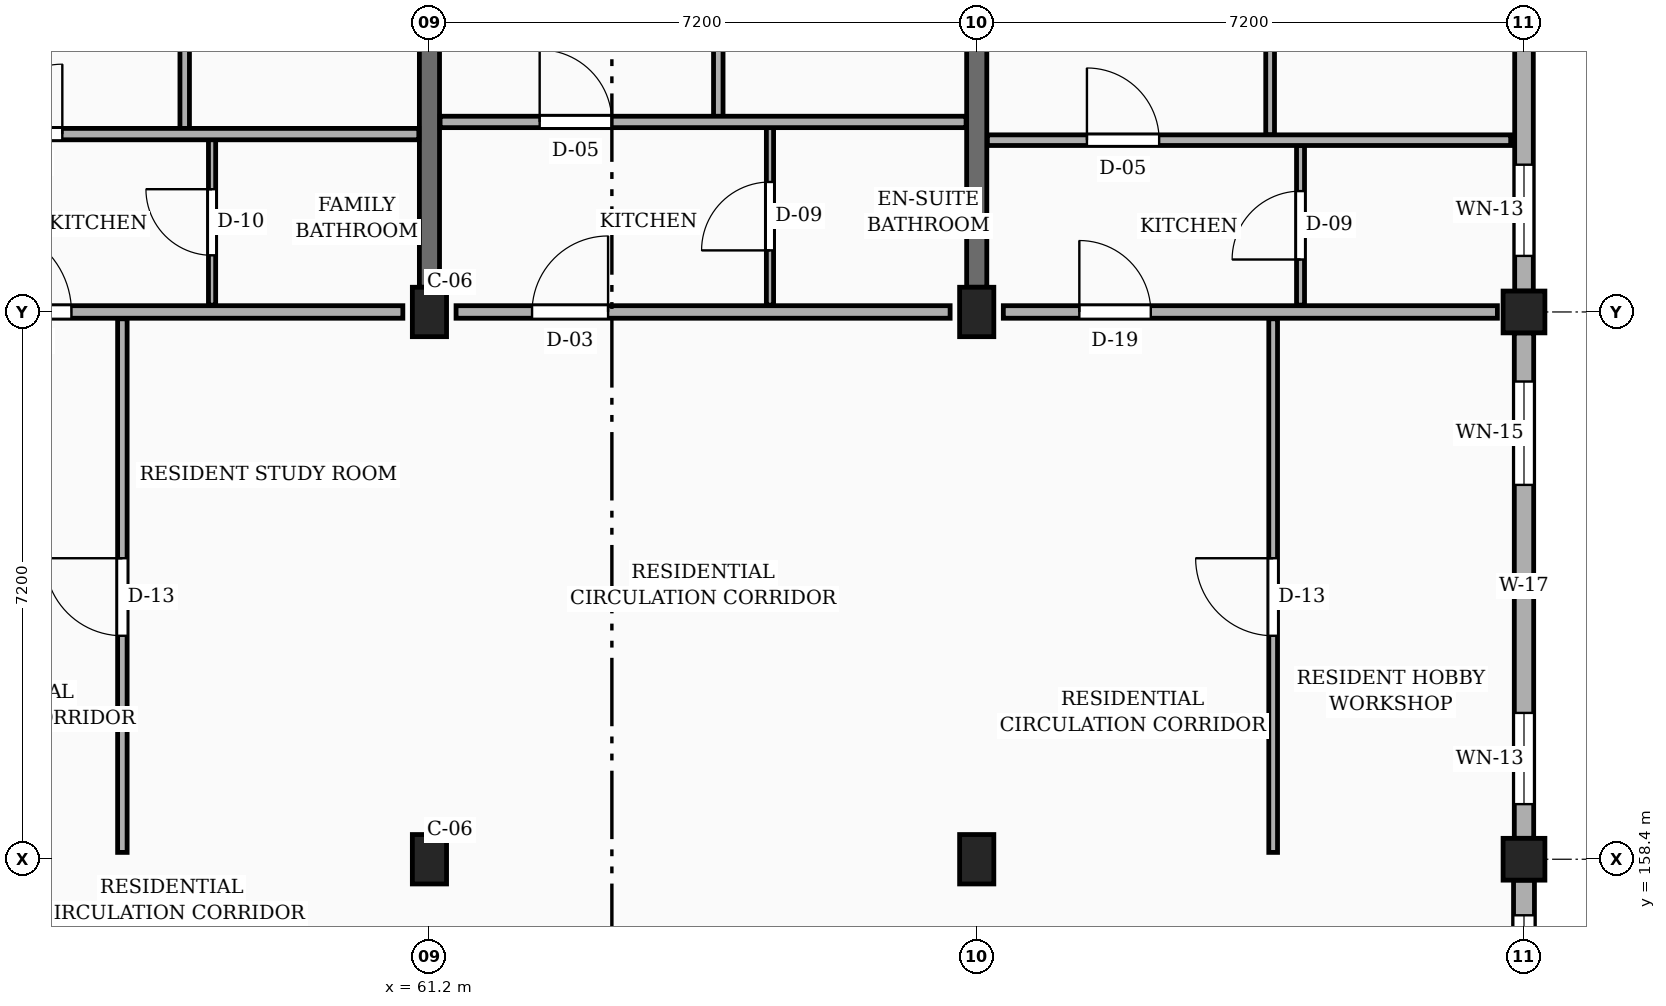
"""IFC4 building model, lengths in metres.
Left out: names, types, materials, properties, quantities, classifications, styles, units other than length and angle.
Written with IfcOpenShell. Run it as: python <this file> out.ifc"""

import sys

from ifc_helpers import new_model, si_unit, direction, frame, frame_2d, origin, origin_2d, place, context, subcontext, project, spatial, rectangle, extrude, element, fill, save


model = new_model("IFC4")
c1 = context("Model", 3, precision=1e-05, world=origin(), true_north=direction((0.0, 1.0)))
c2 = subcontext(c1, "Body", "Model", "MODEL_VIEW")
j1 = project(units=[si_unit("LENGTHUNIT", "METRE"), si_unit("PLANEANGLEUNIT", "RADIAN")], contexts=[c1])
p1 = place(None, origin())
s1 = spatial("IfcSite", under=j1, at=p1, CompositionType="ELEMENT")
p2 = place(p1, origin())
s2 = spatial("IfcBuilding", under=s1, at=p2, CompositionType="ELEMENT")
p3 = place(p2, frame((0.0, 0.0, 10.8)))
s3 = spatial("IfcBuildingStorey", under=s2, at=p3, CompositionType="ELEMENT", Elevation=10.8)
for number, where, z_axis, x_axis in (
    (1, (61.2, 158.4, 0.0), (0.0, 0.0, 1.0), (1.0, 0.0, 0.0)),
    (2, (61.2, 165.6, 0.0), (0.0, 0.0, 1.0), (1.0, 0.0, 0.0)),
    (3, (68.4, 158.4, 0.0), (0.0, 0.0, 1.0), (1.0, 0.0, 0.0)),
    (4, (68.4, 165.6, 0.0), (0.0, 0.0, 1.0), (1.0, 0.0, 0.0)),
):
    element("IfcColumn", number, at=place(p3, frame(where, z_axis=z_axis, x_axis=x_axis)), inside=s3, PredefinedType="COLUMN", context=c2, shape_type="SweptSolid", body=[
        extrude(rectangle(XDim=0.45, YDim=0.65, at=origin_2d()), origin(), (0.0, 0.0, 1.0), 3.15),
    ])
for number, where, z_axis, x_axis in (
    (5, (75.6, 158.4, 0.0), (0.0, 0.0, 1.0), (1.0, 0.0, 0.0)),
    (6, (75.6, 165.6, 0.0), (0.0, 0.0, 1.0), (1.0, 0.0, 0.0)),
):
    element("IfcColumn", number, at=place(p3, frame(where, z_axis=z_axis, x_axis=x_axis)), inside=s3, PredefinedType="COLUMN", context=c2, shape_type="SweptSolid", body=[
        extrude(rectangle(XDim=0.55, YDim=0.55, at=origin_2d()), origin(), (0.0, 0.0, 1.0), 3.15),
    ])
for number, where, z_axis, x_axis in (
    (7, (61.2, 165.925, 0.0), (0.0, 0.0, 1.0), (0.0, 1.0, 0.0)),
    (8, (68.4, 165.925, 0.0), (0.0, 0.0, 1.0), (0.0, 1.0, 0.0)),
):
    element("IfcWall", number, at=place(p3, frame(where, z_axis=z_axis, x_axis=x_axis)), inside=s3, PredefinedType="SOLIDWALL", context=c2, shape_type="SweptSolid", body=[
        extrude(rectangle(XDim=6.6, YDim=0.265, at=frame_2d((3.3, 0.0))), origin(), (0.0, 0.0, 1.0), 2.185),
    ])
p4 = place(p3, frame((75.6, 151.475, 0.0), z_axis=(0.0, 0.0, 1.0), x_axis=(0.0, 1.0, 0.0)))
e9 = element("IfcWall", 9, at=p4, inside=s3, PredefinedType="SOLIDWALL", context=c2, shape_type="SweptSolid", body=[
    extrude(rectangle(XDim=6.65, YDim=0.275, at=frame_2d((3.325, 0.0))), origin(), (0.0, 0.0, 1.0), 2.455),
])
p5 = place(p4, frame((2.155, 0.0, 0.78)))
e10 = element("IfcOpeningElement", 10, at=p5, cuts=e9, PredefinedType="OPENING", context=c2, shape_type="SweptSolid", body=[
    extrude(rectangle(XDim=1.04, YDim=1.26, at=frame_2d((0.52, 0.63))), frame((0.0, 0.147, 0.0), z_axis=(0.0, -1.0, 0.0), x_axis=(1.0, 0.0, 0.0)), (0.0, 0.0, 1.0), 0.295),
])
p6 = place(p4, frame((5.147, 0.0, 0.78)))
e11 = element("IfcOpeningElement", 11, at=p6, cuts=e9, PredefinedType="OPENING", context=c2, shape_type="SweptSolid", body=[
    extrude(rectangle(XDim=1.04, YDim=1.26, at=frame_2d((0.52, 0.63))), frame((0.0, 0.147, 0.0), z_axis=(0.0, -1.0, 0.0), x_axis=(1.0, 0.0, 0.0)), (0.0, 0.0, 1.0), 0.295),
])
p7 = place(p3, frame((75.6, 158.675, 0.0), z_axis=(0.0, 0.0, 1.0), x_axis=(0.0, 1.0, 0.0)))
e12 = element("IfcWall", 12, at=p7, inside=s3, PredefinedType="SOLIDWALL", context=c2, shape_type="SweptSolid", body=[
    extrude(rectangle(XDim=6.65, YDim=0.255, at=frame_2d((3.325, 0.0))), origin(), (0.0, 0.0, 1.0), 2.455),
])
p8 = place(p7, frame((0.45, 0.0, 0.78)))
e13 = element("IfcOpeningElement", 13, at=p8, cuts=e12, PredefinedType="OPENING", context=c2, shape_type="SweptSolid", body=[
    extrude(rectangle(XDim=1.2, YDim=1.26, at=frame_2d((0.6, 0.63))), frame((0.0, 0.137, 0.0), z_axis=(0.0, -1.0, 0.0), x_axis=(1.0, 0.0, 0.0)), (0.0, 0.0, 1.0), 0.275),
])
p9 = place(p7, frame((4.65, 0.0, 0.78)))
e14 = element("IfcOpeningElement", 14, at=p9, cuts=e12, PredefinedType="OPENING", context=c2, shape_type="SweptSolid", body=[
    extrude(rectangle(XDim=1.36, YDim=1.26, at=frame_2d((0.68, 0.63))), frame((0.0, 0.137, 0.0), z_axis=(0.0, -1.0, 0.0), x_axis=(1.0, 0.0, 0.0)), (0.0, 0.0, 1.0), 0.275),
])
p10 = place(p3, frame((75.6, 165.875, 0.0), z_axis=(0.0, 0.0, 1.0), x_axis=(0.0, 1.0, 0.0)))
e15 = element("IfcWall", 15, at=p10, inside=s3, PredefinedType="SOLIDWALL", context=c2, shape_type="SweptSolid", body=[
    extrude(rectangle(XDim=6.65, YDim=0.245, at=frame_2d((3.325, 0.0))), origin(), (0.0, 0.0, 1.0), 2.455),
])
p11 = place(p10, frame((0.462, 0.0, 0.78)))
e16 = element("IfcOpeningElement", 16, at=p11, cuts=e15, PredefinedType="OPENING", context=c2, shape_type="SweptSolid", body=[
    extrude(rectangle(XDim=1.2, YDim=1.26, at=frame_2d((0.6, 0.63))), frame((0.0, 0.133, 0.0), z_axis=(0.0, -1.0, 0.0), x_axis=(1.0, 0.0, 0.0)), (0.0, 0.0, 1.0), 0.265),
])
p12 = place(p10, frame((3.798, 0.0, 0.78)))
e17 = element("IfcOpeningElement", 17, at=p12, cuts=e15, PredefinedType="OPENING", context=c2, shape_type="SweptSolid", body=[
    extrude(rectangle(XDim=0.9, YDim=1.36, at=frame_2d((0.45, 0.68))), frame((0.0, 0.133, 0.0), z_axis=(0.0, -1.0, 0.0), x_axis=(1.0, 0.0, 0.0)), (0.0, 0.0, 1.0), 0.265),
])
p13 = place(p3, frame((54.35, 165.6, 0.0), z_axis=(0.0, 0.0, 1.0), x_axis=(1.0, 0.0, 0.0)))
e18 = element("IfcWall", 18, at=p13, inside=s3, PredefinedType="PARTITIONING", context=c2, shape_type="SweptSolid", body=[
    extrude(rectangle(XDim=6.5, YDim=0.165, at=frame_2d((3.25, 0.0))), origin(), (0.0, 0.0, 1.0), 2.235),
])
p14 = place(p13, frame((1.0, 0.0, 0.0)))
e19 = element("IfcOpeningElement", 19, at=p14, cuts=e18, PredefinedType="OPENING", context=c2, shape_type="SweptSolid", body=[
    extrude(rectangle(XDim=1.14, YDim=2.18, at=frame_2d((0.57, 1.09))), frame((0.0, 0.093, 0.0), z_axis=(0.0, -1.0, 0.0), x_axis=(1.0, 0.0, 0.0)), (0.0, 0.0, 1.0), 0.185),
])
p15 = place(p3, frame((61.55, 165.6, 0.0), z_axis=(0.0, 0.0, 1.0), x_axis=(1.0, 0.0, 0.0)))
e20 = element("IfcWall", 20, at=p15, inside=s3, PredefinedType="PARTITIONING", context=c2, shape_type="SweptSolid", body=[
    extrude(rectangle(XDim=6.5, YDim=0.165, at=frame_2d((3.25, 0.0))), origin(), (0.0, 0.0, 1.0), 2.235),
])
p16 = place(p15, frame((1.0, 0.0, 0.0)))
e21 = element("IfcOpeningElement", 21, at=p16, cuts=e20, PredefinedType="OPENING", context=c2, shape_type="SweptSolid", body=[
    extrude(rectangle(XDim=1.0, YDim=2.15, at=frame_2d((0.5, 1.075))), frame((0.0, 0.093, 0.0), z_axis=(0.0, -1.0, 0.0), x_axis=(1.0, 0.0, 0.0)), (0.0, 0.0, 1.0), 0.185),
])
p17 = place(p3, frame((68.75, 165.6, 0.0), z_axis=(0.0, 0.0, 1.0), x_axis=(1.0, 0.0, 0.0)))
e22 = element("IfcWall", 22, at=p17, inside=s3, PredefinedType="PARTITIONING", context=c2, shape_type="SweptSolid", body=[
    extrude(rectangle(XDim=6.5, YDim=0.165, at=frame_2d((3.25, 0.0))), origin(), (0.0, 0.0, 1.0), 2.235),
])
p18 = place(p17, frame((1.0, 0.0, 0.0)))
e23 = element("IfcOpeningElement", 23, at=p18, cuts=e22, PredefinedType="OPENING", context=c2, shape_type="SweptSolid", body=[
    extrude(rectangle(XDim=0.94, YDim=2.12, at=frame_2d((0.47, 1.06))), frame((0.0, 0.093, 0.0), z_axis=(0.0, -1.0, 0.0), x_axis=(1.0, 0.0, 0.0)), (0.0, 0.0, 1.0), 0.185),
])
p19 = place(p3, frame((57.16, 158.49, 0.0), z_axis=(0.0, 0.0, 1.0), x_axis=(0.0, 1.0, 0.0)))
e24 = element("IfcWall", 24, at=p19, inside=s3, PredefinedType="PARTITIONING", context=c2, shape_type="SweptSolid", body=[
    extrude(rectangle(XDim=7.02, YDim=0.125, at=frame_2d((3.51, 0.0))), origin(), (0.0, 0.0, 1.0), 2.32),
])
p20 = place(p19, frame((2.85, 0.0, 0.0)))
e25 = element("IfcOpeningElement", 25, at=p20, cuts=e24, PredefinedType="OPENING", context=c2, shape_type="SweptSolid", body=[
    extrude(rectangle(XDim=1.02, YDim=2.15, at=frame_2d((0.51, 1.075))), frame((0.0, 0.073, 0.0), z_axis=(0.0, -1.0, 0.0), x_axis=(1.0, 0.0, 0.0)), (0.0, 0.0, 1.0), 0.145),
])
p21 = place(p3, frame((57.98, 168.01, 0.0), z_axis=(0.0, 0.0, 1.0), x_axis=(0.0, 1.0, 0.0)))
e26 = element("IfcWall", 26, at=p21, inside=s3, PredefinedType="PARTITIONING", context=c2, shape_type="SweptSolid", body=[
    extrude(rectangle(XDim=4.615, YDim=0.125, at=frame_2d((2.308, 0.0))), origin(), (0.0, 0.0, 1.0), 2.32),
])
p22 = place(p21, frame((1.867, 0.0, 0.0)))
e27 = element("IfcOpeningElement", 27, at=p22, cuts=e26, PredefinedType="OPENING", context=c2, shape_type="SweptSolid", body=[
    extrude(rectangle(XDim=0.88, YDim=2.08, at=frame_2d((0.44, 1.04))), frame((0.0, 0.073, 0.0), z_axis=(0.0, -1.0, 0.0), x_axis=(1.0, 0.0, 0.0)), (0.0, 0.0, 1.0), 0.145),
])
p23 = place(p3, frame((58.34, 165.69, 0.0), z_axis=(0.0, 0.0, 1.0), x_axis=(0.0, 1.0, 0.0)))
e28 = element("IfcWall", 28, at=p23, inside=s3, PredefinedType="PARTITIONING", context=c2, shape_type="SweptSolid", body=[
    extrude(rectangle(XDim=2.18, YDim=0.095, at=frame_2d((1.09, 0.0))), origin(), (0.0, 0.0, 1.0), 2.32),
])
p24 = place(p23, frame((0.655, 0.0, 0.0)))
e29 = element("IfcOpeningElement", 29, at=p24, cuts=e28, PredefinedType="OPENING", context=c2, shape_type="SweptSolid", body=[
    extrude(rectangle(XDim=0.87, YDim=2.05, at=frame_2d((0.435, 1.025))), frame((0.0, 0.058, 0.0), z_axis=(0.0, -1.0, 0.0), x_axis=(1.0, 0.0, 0.0)), (0.0, 0.0, 1.0), 0.115),
])
p25 = place(p3, frame((54.14, 167.94, 0.0), z_axis=(0.0, 0.0, 1.0), x_axis=(1.0, 0.0, 0.0)))
e30 = element("IfcWall", 30, at=p25, inside=s3, PredefinedType="PARTITIONING", context=c2, shape_type="SweptSolid", body=[
    extrude(rectangle(XDim=6.92, YDim=0.15, at=frame_2d((3.46, 0.0))), origin(), (0.0, 0.0, 1.0), 2.32),
])
p26 = place(p25, frame((1.31, 0.0, 0.0)))
e31 = element("IfcOpeningElement", 31, at=p26, cuts=e30, PredefinedType="OPENING", context=c2, shape_type="SweptSolid", body=[
    extrude(rectangle(XDim=0.92, YDim=2.1, at=frame_2d((0.46, 1.05))), frame((0.0, 0.085, 0.0), z_axis=(0.0, -1.0, 0.0), x_axis=(1.0, 0.0, 0.0)), (0.0, 0.0, 1.0), 0.17),
])
p27 = place(p3, frame((65.0, 168.17, 0.0), z_axis=(0.0, 0.0, 1.0), x_axis=(0.0, 1.0, 0.0)))
e32 = element("IfcWall", 32, at=p27, inside=s3, PredefinedType="PARTITIONING", context=c2, shape_type="SweptSolid", body=[
    extrude(rectangle(XDim=4.455, YDim=0.125, at=frame_2d((2.228, 0.0))), origin(), (0.0, 0.0, 1.0), 2.32),
])
p28 = place(p27, frame((1.778, 0.0, 0.0)))
e33 = element("IfcOpeningElement", 33, at=p28, cuts=e32, PredefinedType="OPENING", context=c2, shape_type="SweptSolid", body=[
    extrude(rectangle(XDim=0.9, YDim=2.1, at=frame_2d((0.45, 1.05))), frame((0.0, 0.073, 0.0), z_axis=(0.0, -1.0, 0.0), x_axis=(1.0, 0.0, 0.0)), (0.0, 0.0, 1.0), 0.145),
])
p29 = place(p3, frame((65.68, 165.69, 0.0), z_axis=(0.0, 0.0, 1.0), x_axis=(0.0, 1.0, 0.0)))
e34 = element("IfcWall", 34, at=p29, inside=s3, PredefinedType="PARTITIONING", context=c2, shape_type="SweptSolid", body=[
    extrude(rectangle(XDim=2.34, YDim=0.095, at=frame_2d((1.17, 0.0))), origin(), (0.0, 0.0, 1.0), 2.32),
])
p30 = place(p29, frame((0.72, 0.0, 0.0)))
e35 = element("IfcOpeningElement", 35, at=p30, cuts=e34, PredefinedType="OPENING", context=c2, shape_type="SweptSolid", body=[
    extrude(rectangle(XDim=0.9, YDim=2.05, at=frame_2d((0.45, 1.025))), frame((0.0, 0.058, 0.0), z_axis=(0.0, -1.0, 0.0), x_axis=(1.0, 0.0, 0.0)), (0.0, 0.0, 1.0), 0.115),
])
p31 = place(p3, frame((61.34, 168.1, 0.0), z_axis=(0.0, 0.0, 1.0), x_axis=(1.0, 0.0, 0.0)))
e36 = element("IfcWall", 36, at=p31, inside=s3, PredefinedType="PARTITIONING", context=c2, shape_type="SweptSolid", body=[
    extrude(rectangle(XDim=6.92, YDim=0.15, at=frame_2d((3.46, 0.0))), origin(), (0.0, 0.0, 1.0), 2.32),
])
p32 = place(p31, frame((1.31, 0.0, 0.0)))
e37 = element("IfcOpeningElement", 37, at=p32, cuts=e36, PredefinedType="OPENING", context=c2, shape_type="SweptSolid", body=[
    extrude(rectangle(XDim=0.95, YDim=2.1, at=frame_2d((0.475, 1.05))), frame((0.0, 0.085, 0.0), z_axis=(0.0, -1.0, 0.0), x_axis=(1.0, 0.0, 0.0)), (0.0, 0.0, 1.0), 0.17),
])
p33 = place(p3, frame((72.3, 158.49, 0.0), z_axis=(0.0, 0.0, 1.0), x_axis=(0.0, 1.0, 0.0)))
e38 = element("IfcWall", 38, at=p33, inside=s3, PredefinedType="PARTITIONING", context=c2, shape_type="SweptSolid", body=[
    extrude(rectangle(XDim=7.02, YDim=0.115, at=frame_2d((3.51, 0.0))), origin(), (0.0, 0.0, 1.0), 2.32),
])
p34 = place(p33, frame((2.85, 0.0, 0.0)))
e39 = element("IfcOpeningElement", 39, at=p34, cuts=e38, PredefinedType="OPENING", context=c2, shape_type="SweptSolid", body=[
    extrude(rectangle(XDim=1.02, YDim=2.15, at=frame_2d((0.51, 1.075))), frame((0.0, 0.067, 0.0), z_axis=(0.0, -1.0, 0.0), x_axis=(1.0, 0.0, 0.0)), (0.0, 0.0, 1.0), 0.135),
])
p35 = place(p3, frame((72.26, 167.93, 0.0), z_axis=(0.0, 0.0, 1.0), x_axis=(0.0, 1.0, 0.0)))
e40 = element("IfcWall", 40, at=p35, inside=s3, PredefinedType="PARTITIONING", context=c2, shape_type="SweptSolid", body=[
    extrude(rectangle(XDim=4.695, YDim=0.115, at=frame_2d((2.348, 0.0))), origin(), (0.0, 0.0, 1.0), 2.32),
])
p36 = place(p35, frame((1.897, 0.0, 0.0)))
e41 = element("IfcOpeningElement", 41, at=p36, cuts=e40, PredefinedType="OPENING", context=c2, shape_type="SweptSolid", body=[
    extrude(rectangle(XDim=0.9, YDim=2.1, at=frame_2d((0.45, 1.05))), frame((0.0, 0.067, 0.0), z_axis=(0.0, -1.0, 0.0), x_axis=(1.0, 0.0, 0.0)), (0.0, 0.0, 1.0), 0.135),
])
p37 = place(p3, frame((72.66, 165.69, 0.0), z_axis=(0.0, 0.0, 1.0), x_axis=(0.0, 1.0, 0.0)))
e42 = element("IfcWall", 42, at=p37, inside=s3, PredefinedType="PARTITIONING", context=c2, shape_type="SweptSolid", body=[
    extrude(rectangle(XDim=2.1, YDim=0.105, at=frame_2d((1.05, 0.0))), origin(), (0.0, 0.0, 1.0), 2.32),
])
p38 = place(p37, frame((0.6, 0.0, 0.0)))
e43 = element("IfcOpeningElement", 43, at=p38, cuts=e42, PredefinedType="OPENING", context=c2, shape_type="SweptSolid", body=[
    extrude(rectangle(XDim=0.9, YDim=2.05, at=frame_2d((0.45, 1.025))), frame((0.0, 0.062, 0.0), z_axis=(0.0, -1.0, 0.0), x_axis=(1.0, 0.0, 0.0)), (0.0, 0.0, 1.0), 0.125),
])
p39 = place(p3, frame((68.54, 167.86, 0.0), z_axis=(0.0, 0.0, 1.0), x_axis=(1.0, 0.0, 0.0)))
e44 = element("IfcWall", 44, at=p39, inside=s3, PredefinedType="PARTITIONING", context=c2, shape_type="SweptSolid", body=[
    extrude(rectangle(XDim=6.885, YDim=0.14, at=frame_2d((3.442, 0.0))), origin(), (0.0, 0.0, 1.0), 2.32),
])
p40 = place(p39, frame((1.31, 0.0, 0.0)))
e45 = element("IfcOpeningElement", 45, at=p40, cuts=e44, PredefinedType="OPENING", context=c2, shape_type="SweptSolid", body=[
    extrude(rectangle(XDim=0.95, YDim=2.1, at=frame_2d((0.475, 1.05))), frame((0.0, 0.08, 0.0), z_axis=(0.0, -1.0, 0.0), x_axis=(1.0, 0.0, 0.0)), (0.0, 0.0, 1.0), 0.16),
])
p41 = place(p6, origin())
e46 = element("IfcWindow", 46, at=p41, inside=s3, PartitioningType="SINGLE_PANEL", PredefinedType="WINDOW", context=c2, shape_type="SweptSolid", body=[
    extrude(rectangle(XDim=1.04, YDim=1.26, at=frame_2d((0.52, 0.63))), frame((0.0, 0.03, 0.0), z_axis=(0.0, -1.0, 0.0), x_axis=(1.0, 0.0, 0.0)), (0.0, 0.0, 1.0), 0.06),
])
fill(e11, e46)
p42 = place(p8, origin())
e47 = element("IfcWindow", 47, at=p42, inside=s3, PartitioningType="SINGLE_PANEL", PredefinedType="WINDOW", context=c2, shape_type="SweptSolid", body=[
    extrude(rectangle(XDim=1.2, YDim=1.26, at=frame_2d((0.6, 0.63))), frame((0.0, 0.03, 0.0), z_axis=(0.0, -1.0, 0.0), x_axis=(1.0, 0.0, 0.0)), (0.0, 0.0, 1.0), 0.06),
])
fill(e13, e47)
p43 = place(p9, origin())
e48 = element("IfcWindow", 48, at=p43, inside=s3, PartitioningType="SINGLE_PANEL", PredefinedType="WINDOW", context=c2, shape_type="SweptSolid", body=[
    extrude(rectangle(XDim=1.36, YDim=1.26, at=frame_2d((0.68, 0.63))), frame((0.0, 0.03, 0.0), z_axis=(0.0, -1.0, 0.0), x_axis=(1.0, 0.0, 0.0)), (0.0, 0.0, 1.0), 0.06),
])
fill(e14, e48)
p44 = place(p11, origin())
e49 = element("IfcWindow", 49, at=p44, inside=s3, PartitioningType="SINGLE_PANEL", PredefinedType="WINDOW", context=c2, shape_type="SweptSolid", body=[
    extrude(rectangle(XDim=1.2, YDim=1.26, at=frame_2d((0.6, 0.63))), frame((0.0, 0.03, 0.0), z_axis=(0.0, -1.0, 0.0), x_axis=(1.0, 0.0, 0.0)), (0.0, 0.0, 1.0), 0.06),
])
fill(e16, e49)
p45 = place(p14, origin())
e50 = element("IfcDoor", 50, at=p45, inside=s3, OperationType="SINGLE_SWING_LEFT", PredefinedType="DOOR", context=c2, shape_type="SweptSolid", body=[
    extrude(rectangle(XDim=1.14, YDim=2.18, at=frame_2d((0.57, 1.09))), frame((0.0, 0.025, 0.0), z_axis=(0.0, -1.0, 0.0), x_axis=(1.0, 0.0, 0.0)), (0.0, 0.0, 1.0), 0.05),
])
fill(e19, e50)
p46 = place(p16, origin())
e51 = element("IfcDoor", 51, at=p46, inside=s3, OperationType="SINGLE_SWING_RIGHT", PredefinedType="DOOR", context=c2, shape_type="SweptSolid", body=[
    extrude(rectangle(XDim=1.0, YDim=2.15, at=frame_2d((0.5, 1.075))), frame((0.0, 0.025, 0.0), z_axis=(0.0, -1.0, 0.0), x_axis=(1.0, 0.0, 0.0)), (0.0, 0.0, 1.0), 0.05),
])
fill(e21, e51)
p47 = place(p18, origin())
e52 = element("IfcDoor", 52, at=p47, inside=s3, OperationType="SINGLE_SWING_LEFT", PredefinedType="DOOR", context=c2, shape_type="SweptSolid", body=[
    extrude(rectangle(XDim=0.94, YDim=2.12, at=frame_2d((0.47, 1.06))), frame((0.0, 0.025, 0.0), z_axis=(0.0, -1.0, 0.0), x_axis=(1.0, 0.0, 0.0)), (0.0, 0.0, 1.0), 0.05),
])
fill(e23, e52)
p48 = place(p20, origin())
e53 = element("IfcDoor", 53, at=p48, inside=s3, OperationType="SINGLE_SWING_RIGHT", PredefinedType="DOOR", context=c2, shape_type="SweptSolid", body=[
    extrude(rectangle(XDim=1.02, YDim=2.15, at=frame_2d((0.51, 1.075))), frame((0.0, 0.025, 0.0), z_axis=(0.0, -1.0, 0.0), x_axis=(1.0, 0.0, 0.0)), (0.0, 0.0, 1.0), 0.05),
])
fill(e25, e53)
p49 = place(p24, origin())
e54 = element("IfcDoor", 54, at=p49, inside=s3, OperationType="SINGLE_SWING_RIGHT", PredefinedType="DOOR", context=c2, shape_type="SweptSolid", body=[
    extrude(rectangle(XDim=0.87, YDim=2.05, at=frame_2d((0.435, 1.025))), frame((0.0, 0.025, 0.0), z_axis=(0.0, -1.0, 0.0), x_axis=(1.0, 0.0, 0.0)), (0.0, 0.0, 1.0), 0.05),
])
fill(e29, e54)
p50 = place(p26, origin())
e55 = element("IfcDoor", 55, at=p50, inside=s3, OperationType="SINGLE_SWING_RIGHT", PredefinedType="DOOR", context=c2, shape_type="SweptSolid", body=[
    extrude(rectangle(XDim=0.92, YDim=2.1, at=frame_2d((0.46, 1.05))), frame((0.0, 0.025, 0.0), z_axis=(0.0, -1.0, 0.0), x_axis=(1.0, 0.0, 0.0)), (0.0, 0.0, 1.0), 0.05),
])
fill(e31, e55)
p51 = place(p30, origin())
e56 = element("IfcDoor", 56, at=p51, inside=s3, OperationType="SINGLE_SWING_LEFT", PredefinedType="DOOR", context=c2, shape_type="SweptSolid", body=[
    extrude(rectangle(XDim=0.9, YDim=2.05, at=frame_2d((0.45, 1.025))), frame((0.0, 0.025, 0.0), z_axis=(0.0, -1.0, 0.0), x_axis=(1.0, 0.0, 0.0)), (0.0, 0.0, 1.0), 0.05),
])
fill(e35, e56)
p52 = place(p32, origin())
e57 = element("IfcDoor", 57, at=p52, inside=s3, OperationType="SINGLE_SWING_LEFT", PredefinedType="DOOR", context=c2, shape_type="SweptSolid", body=[
    extrude(rectangle(XDim=0.95, YDim=2.1, at=frame_2d((0.475, 1.05))), frame((0.0, 0.025, 0.0), z_axis=(0.0, -1.0, 0.0), x_axis=(1.0, 0.0, 0.0)), (0.0, 0.0, 1.0), 0.05),
])
fill(e37, e57)
p53 = place(p34, origin())
e58 = element("IfcDoor", 58, at=p53, inside=s3, OperationType="SINGLE_SWING_RIGHT", PredefinedType="DOOR", context=c2, shape_type="SweptSolid", body=[
    extrude(rectangle(XDim=1.02, YDim=2.15, at=frame_2d((0.51, 1.075))), frame((0.0, 0.025, 0.0), z_axis=(0.0, -1.0, 0.0), x_axis=(1.0, 0.0, 0.0)), (0.0, 0.0, 1.0), 0.05),
])
fill(e39, e58)
p54 = place(p38, origin())
e59 = element("IfcDoor", 59, at=p54, inside=s3, OperationType="SINGLE_SWING_LEFT", PredefinedType="DOOR", context=c2, shape_type="SweptSolid", body=[
    extrude(rectangle(XDim=0.9, YDim=2.05, at=frame_2d((0.45, 1.025))), frame((0.0, 0.025, 0.0), z_axis=(0.0, -1.0, 0.0), x_axis=(1.0, 0.0, 0.0)), (0.0, 0.0, 1.0), 0.05),
])
fill(e43, e59)
p55 = place(p40, origin())
e60 = element("IfcDoor", 60, at=p55, inside=s3, OperationType="SINGLE_SWING_LEFT", PredefinedType="DOOR", context=c2, shape_type="SweptSolid", body=[
    extrude(rectangle(XDim=0.95, YDim=2.1, at=frame_2d((0.475, 1.05))), frame((0.0, 0.025, 0.0), z_axis=(0.0, -1.0, 0.0), x_axis=(1.0, 0.0, 0.0)), (0.0, 0.0, 1.0), 0.05),
])
fill(e45, e60)
save(model, sys.argv[1])
